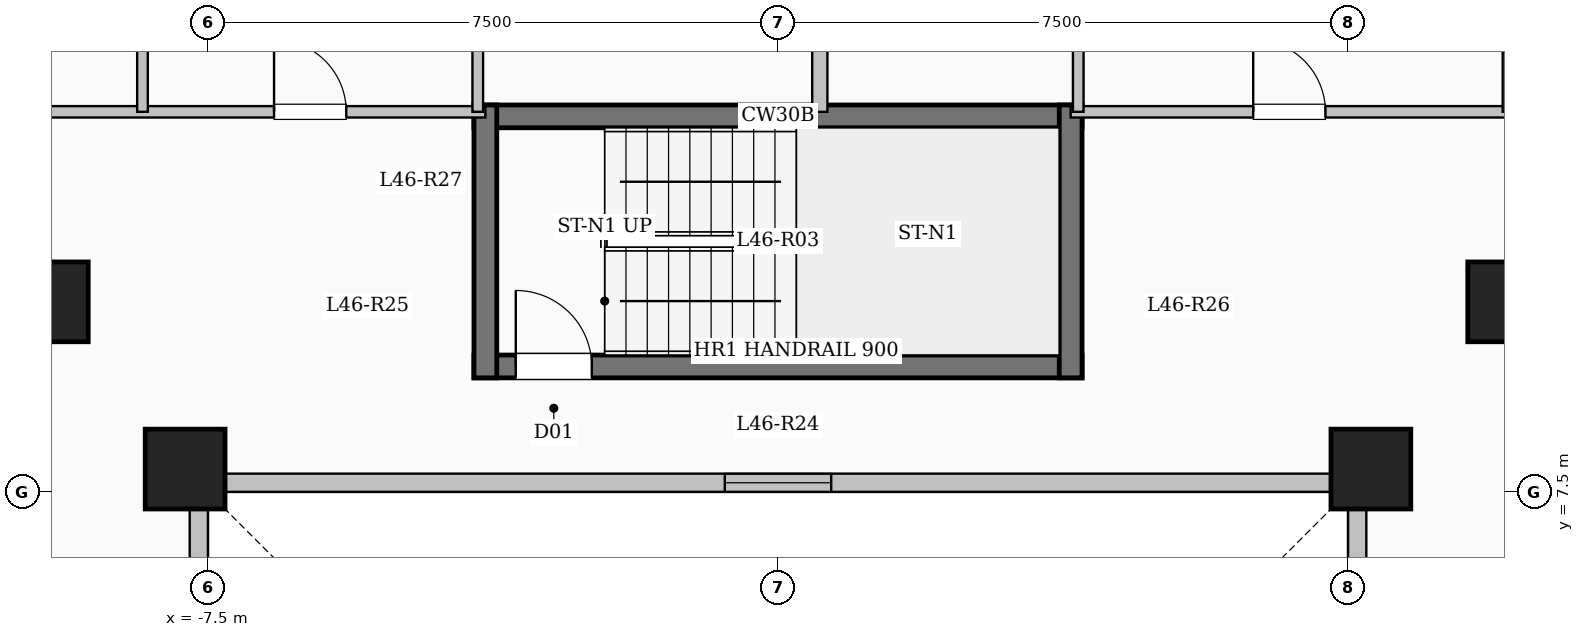
"""IFC4 building model, lengths in metres.
Left out: names, types, materials, properties, quantities, classifications, styles, units other than length and angle.
Written with IfcOpenShell. Run it as: python <this file> out.ifc"""

import sys

from ifc_helpers import new_model, si_unit, direction, frame, frame_2d, origin, origin_2d, place, context, subcontext, project, spatial, rectangle, extrude, element, fill, save


model = new_model("IFC4")
c1 = context("Model", 3, precision=1e-05, world=origin(), true_north=direction((0.0, 1.0)))
c2 = subcontext(c1, "Body", "Model", "MODEL_VIEW")
j1 = project(units=[si_unit("LENGTHUNIT", "METRE"), si_unit("PLANEANGLEUNIT", "RADIAN")], contexts=[c1])
p1 = place(None, origin())
s1 = spatial("IfcSite", under=j1, at=p1, CompositionType="ELEMENT")
p2 = place(p1, origin())
s2 = spatial("IfcBuilding", under=s1, at=p2, CompositionType="ELEMENT")
p3 = place(p2, frame((0.0, 0.0, 169.45)))
s3 = spatial("IfcBuildingStorey", under=s2, at=p3, CompositionType="ELEMENT", Elevation=169.45)
for number, where, z_axis, x_axis in (
    (1, (-7.8, 7.8, 0.0), (0.0, 0.0, 1.0), (1.0, 0.0, 0.0)),
    (2, (7.8, 7.8, 0.0), (0.0, 0.0, 1.0), (1.0, 0.0, 0.0)),
    (3, (-9.6, 10.0, 0.0), (0.0, 0.0, 1.0), (1.0, 0.0, 0.0)),
    (4, (9.6, 10.0, 0.0), (0.0, 0.0, 1.0), (1.0, 0.0, 0.0)),
):
    element("IfcColumn", number, at=place(p3, frame(where, z_axis=z_axis, x_axis=x_axis)), inside=s3, PredefinedType="COLUMN", context=c2, shape_type="SweptSolid", body=[
        extrude(rectangle(XDim=1.05, YDim=1.05, at=origin_2d()), origin(), (0.0, 0.0, 1.0), 3.35),
    ])
p4 = place(p3, frame((7.62, -7.62, 0.0), z_axis=(0.0, 0.0, 1.0), x_axis=(0.0, 1.0, 0.0)))
e5 = element("IfcWall", 5, at=p4, inside=s3, PredefinedType="SOLIDWALL", context=c2, shape_type="SweptSolid", body=[
    extrude(rectangle(XDim=15.24, YDim=0.24, at=frame_2d((7.62, 0.0))), origin(), (0.0, 0.0, 1.0), 3.05),
])
p5 = place(p4, frame((6.92, 0.0, 0.95)))
e6 = element("IfcOpeningElement", 6, at=p5, cuts=e5, PredefinedType="OPENING", context=c2, shape_type="SweptSolid", body=[
    extrude(rectangle(XDim=1.4, YDim=1.5, at=frame_2d((0.7, 0.75))), frame((0.0, 0.13, 0.0), z_axis=(0.0, -1.0, 0.0), x_axis=(1.0, 0.0, 0.0)), (0.0, 0.0, 1.0), 0.26),
])
p6 = place(p3, frame((7.62, 7.62, 0.0), z_axis=(0.0, 0.0, 1.0), x_axis=(-1.0, 0.0, 0.0)))
e7 = element("IfcWall", 7, at=p6, inside=s3, PredefinedType="SOLIDWALL", context=c2, shape_type="SweptSolid", body=[
    extrude(rectangle(XDim=15.24, YDim=0.24, at=frame_2d((7.62, 0.0))), origin(), (0.0, 0.0, 1.0), 3.05),
])
p7 = place(p6, frame((6.92, 0.0, 0.95)))
e8 = element("IfcOpeningElement", 8, at=p7, cuts=e7, PredefinedType="OPENING", context=c2, shape_type="SweptSolid", body=[
    extrude(rectangle(XDim=1.4, YDim=1.5, at=frame_2d((0.7, 0.75))), frame((0.0, 0.13, 0.0), z_axis=(0.0, -1.0, 0.0), x_axis=(1.0, 0.0, 0.0)), (0.0, 0.0, 1.0), 0.26),
])
p8 = place(p3, frame((-7.62, 7.62, 0.0), z_axis=(0.0, 0.0, 1.0), x_axis=(0.0, -1.0, 0.0)))
e9 = element("IfcWall", 9, at=p8, inside=s3, PredefinedType="SOLIDWALL", context=c2, shape_type="SweptSolid", body=[
    extrude(rectangle(XDim=15.24, YDim=0.24, at=frame_2d((7.62, 0.0))), origin(), (0.0, 0.0, 1.0), 3.05),
])
p9 = place(p8, frame((6.92, 0.0, 0.95)))
e10 = element("IfcOpeningElement", 10, at=p9, cuts=e9, PredefinedType="OPENING", context=c2, shape_type="SweptSolid", body=[
    extrude(rectangle(XDim=1.4, YDim=1.5, at=frame_2d((0.7, 0.75))), frame((0.0, 0.13, 0.0), z_axis=(0.0, -1.0, 0.0), x_axis=(1.0, 0.0, 0.0)), (0.0, 0.0, 1.0), 0.26),
])
p10 = place(p3, frame((-4.0, 12.44, 0.0), z_axis=(0.0, 0.0, 1.0), x_axis=(1.0, 0.0, 0.0)))
e11 = element("IfcWall", 11, at=p10, inside=s3, PredefinedType="SHEAR", context=c2, shape_type="SweptSolid", body=[
    extrude(rectangle(XDim=8.0, YDim=0.3, at=frame_2d((4.0, 0.0))), origin(), (0.0, 0.0, 1.0), 3.35),
])
p11 = place(p3, frame((-4.0, 9.15, 0.0), z_axis=(0.0, 0.0, 1.0), x_axis=(1.0, 0.0, 0.0)))
e12 = element("IfcWall", 12, at=p11, inside=s3, PredefinedType="SHEAR", context=c2, shape_type="SweptSolid", body=[
    extrude(rectangle(XDim=8.0, YDim=0.3, at=frame_2d((4.0, 0.0))), origin(), (0.0, 0.0, 1.0), 3.35),
])
p12 = place(p11, frame((0.55, 0.0, 0.0)))
e13 = element("IfcOpeningElement", 13, at=p12, cuts=e12, PredefinedType="OPENING", context=c2, shape_type="SweptSolid", body=[
    extrude(rectangle(XDim=1.0, YDim=2.15, at=frame_2d((0.5, 1.075))), frame((0.0, 0.16, 0.0), z_axis=(0.0, -1.0, 0.0), x_axis=(1.0, 0.0, 0.0)), (0.0, 0.0, 1.0), 0.32),
])
for number, where, z_axis, x_axis in (
    (14, (-3.85, 9.0, 0.0), (0.0, 0.0, 1.0), (0.0, 1.0, 0.0)),
    (15, (3.85, 9.0, 0.0), (0.0, 0.0, 1.0), (0.0, 1.0, 0.0)),
):
    element("IfcWall", number, at=place(p3, frame(where, z_axis=z_axis, x_axis=x_axis)), inside=s3, PredefinedType="SHEAR", context=c2, shape_type="SweptSolid", body=[
        extrude(rectangle(XDim=3.59, YDim=0.3, at=frame_2d((1.795, 0.0))), origin(), (0.0, 0.0, 1.0), 3.35),
    ])
p13 = place(p3, frame((-19.55, 12.5, 0.0), z_axis=(0.0, 0.0, 1.0), x_axis=(1.0, 0.0, 0.0)))
e16 = element("IfcWall", 16, at=p13, inside=s3, PredefinedType="PARTITIONING", context=c2, shape_type="SweptSolid", body=[
    extrude(rectangle(XDim=15.7, YDim=0.15, at=frame_2d((7.85, 0.0))), origin(), (0.0, 0.0, 1.0), 3.05),
])
p14 = place(p13, frame((2.292, 0.0, 0.0)))
e17 = element("IfcOpeningElement", 17, at=p14, cuts=e16, PredefinedType="OPENING", context=c2, shape_type="SweptSolid", body=[
    extrude(rectangle(XDim=0.95, YDim=2.15, at=frame_2d((0.475, 1.075))), frame((0.0, 0.085, 0.0), z_axis=(0.0, -1.0, 0.0), x_axis=(1.0, 0.0, 0.0)), (0.0, 0.0, 1.0), 0.17),
])
p15 = place(p13, frame((7.917, 0.0, 0.0)))
e18 = element("IfcOpeningElement", 18, at=p15, cuts=e16, PredefinedType="OPENING", context=c2, shape_type="SweptSolid", body=[
    extrude(rectangle(XDim=0.95, YDim=2.15, at=frame_2d((0.475, 1.075))), frame((0.0, 0.085, 0.0), z_axis=(0.0, -1.0, 0.0), x_axis=(1.0, 0.0, 0.0)), (0.0, 0.0, 1.0), 0.17),
])
p16 = place(p13, frame((12.92, 0.0, 0.0)))
e19 = element("IfcOpeningElement", 19, at=p16, cuts=e16, PredefinedType="OPENING", context=c2, shape_type="SweptSolid", body=[
    extrude(rectangle(XDim=0.95, YDim=2.15, at=frame_2d((0.475, 1.075))), frame((0.0, 0.085, 0.0), z_axis=(0.0, -1.0, 0.0), x_axis=(1.0, 0.0, 0.0)), (0.0, 0.0, 1.0), 0.17),
])
p17 = place(p3, frame((3.85, 12.5, 0.0), z_axis=(0.0, 0.0, 1.0), x_axis=(1.0, 0.0, 0.0)))
e20 = element("IfcWall", 20, at=p17, inside=s3, PredefinedType="PARTITIONING", context=c2, shape_type="SweptSolid", body=[
    extrude(rectangle(XDim=15.7, YDim=0.15, at=frame_2d((7.85, 0.0))), origin(), (0.0, 0.0, 1.0), 3.05),
])
p18 = place(p17, frame((2.402, 0.0, 0.0)))
e21 = element("IfcOpeningElement", 21, at=p18, cuts=e20, PredefinedType="OPENING", context=c2, shape_type="SweptSolid", body=[
    extrude(rectangle(XDim=0.95, YDim=2.15, at=frame_2d((0.475, 1.075))), frame((0.0, 0.085, 0.0), z_axis=(0.0, -1.0, 0.0), x_axis=(1.0, 0.0, 0.0)), (0.0, 0.0, 1.0), 0.17),
])
p19 = place(p17, frame((8.026, 0.0, 0.0)))
e22 = element("IfcOpeningElement", 22, at=p19, cuts=e20, PredefinedType="OPENING", context=c2, shape_type="SweptSolid", body=[
    extrude(rectangle(XDim=0.95, YDim=2.15, at=frame_2d((0.475, 1.075))), frame((0.0, 0.085, 0.0), z_axis=(0.0, -1.0, 0.0), x_axis=(1.0, 0.0, 0.0)), (0.0, 0.0, 1.0), 0.17),
])
p20 = place(p17, frame((13.03, 0.0, 0.0)))
e23 = element("IfcOpeningElement", 23, at=p20, cuts=e20, PredefinedType="OPENING", context=c2, shape_type="SweptSolid", body=[
    extrude(rectangle(XDim=0.95, YDim=2.15, at=frame_2d((0.475, 1.075))), frame((0.0, 0.085, 0.0), z_axis=(0.0, -1.0, 0.0), x_axis=(1.0, 0.0, 0.0)), (0.0, 0.0, 1.0), 0.17),
])
p21 = place(p3, frame((0.55, 12.5, 0.0), z_axis=(0.0, 0.0, 1.0), x_axis=(0.0, 1.0, 0.0)))
e24 = element("IfcWall", 24, at=p21, inside=s3, PredefinedType="SOLIDWALL", context=c2, shape_type="SweptSolid", body=[
    extrude(rectangle(XDim=10.18, YDim=0.2, at=frame_2d((5.09, 0.0))), origin(), (0.0, 0.0, 1.0), 3.05),
])
p22 = place(p3, frame((-3.95, 12.5, 0.0), z_axis=(0.0, 0.0, 1.0), x_axis=(0.0, 1.0, 0.0)))
e25 = element("IfcWall", 25, at=p22, inside=s3, PredefinedType="PARTITIONING", context=c2, shape_type="SweptSolid", body=[
    extrude(rectangle(XDim=8.65, YDim=0.14, at=frame_2d((4.325, 0.0))), origin(), (0.0, 0.0, 1.0), 3.05),
])
p23 = place(p22, frame((1.2, 0.0, 0.0)))
e26 = element("IfcOpeningElement", 26, at=p23, cuts=e25, PredefinedType="OPENING", context=c2, shape_type="SweptSolid", body=[
    extrude(rectangle(XDim=0.95, YDim=2.15, at=frame_2d((0.475, 1.075))), frame((0.0, 0.08, 0.0), z_axis=(0.0, -1.0, 0.0), x_axis=(1.0, 0.0, 0.0)), (0.0, 0.0, 1.0), 0.16),
])
p24 = place(p3, frame((-8.361, 12.5, 0.0), z_axis=(0.0, 0.0, 1.0), x_axis=(0.0, 1.0, 0.0)))
e27 = element("IfcWall", 27, at=p24, inside=s3, PredefinedType="PARTITIONING", context=c2, shape_type="SweptSolid", body=[
    extrude(rectangle(XDim=8.65, YDim=0.14, at=frame_2d((4.325, 0.0))), origin(), (0.0, 0.0, 1.0), 3.05),
])
p25 = place(p3, frame((3.95, 12.5, 0.0), z_axis=(0.0, 0.0, 1.0), x_axis=(0.0, 1.0, 0.0)))
e28 = element("IfcWall", 28, at=p25, inside=s3, PredefinedType="PARTITIONING", context=c2, shape_type="SweptSolid", body=[
    extrude(rectangle(XDim=8.65, YDim=0.14, at=frame_2d((4.325, 0.0))), origin(), (0.0, 0.0, 1.0), 3.05),
])
p26 = place(p25, frame((1.2, 0.0, 0.0)))
e29 = element("IfcOpeningElement", 29, at=p26, cuts=e28, PredefinedType="OPENING", context=c2, shape_type="SweptSolid", body=[
    extrude(rectangle(XDim=0.95, YDim=2.15, at=frame_2d((0.475, 1.075))), frame((0.0, 0.08, 0.0), z_axis=(0.0, -1.0, 0.0), x_axis=(1.0, 0.0, 0.0)), (0.0, 0.0, 1.0), 0.16),
])
p27 = place(p3, frame((9.604, 12.5, 0.0), z_axis=(0.0, 0.0, 1.0), x_axis=(0.0, 1.0, 0.0)))
e30 = element("IfcWall", 30, at=p27, inside=s3, PredefinedType="PARTITIONING", context=c2, shape_type="SweptSolid", body=[
    extrude(rectangle(XDim=8.65, YDim=0.14, at=frame_2d((4.325, 0.0))), origin(), (0.0, 0.0, 1.0), 3.05),
])
p28 = place(p7, origin())
e31 = element("IfcWindow", 31, at=p28, inside=s3, PartitioningType="SINGLE_PANEL", PredefinedType="WINDOW", context=c2, shape_type="SweptSolid", body=[
    extrude(rectangle(XDim=1.4, YDim=1.5, at=frame_2d((0.7, 0.75))), frame((0.0, 0.03, 0.0), z_axis=(0.0, -1.0, 0.0), x_axis=(1.0, 0.0, 0.0)), (0.0, 0.0, 1.0), 0.06),
])
fill(e8, e31)
p29 = place(p12, origin())
e32 = element("IfcDoor", 32, at=p29, inside=s3, OperationType="SINGLE_SWING_LEFT", PredefinedType="DOOR", context=c2, shape_type="SweptSolid", body=[
    extrude(rectangle(XDim=1.0, YDim=2.15, at=frame_2d((0.5, 1.075))), frame((0.0, 0.025, 0.0), z_axis=(0.0, -1.0, 0.0), x_axis=(1.0, 0.0, 0.0)), (0.0, 0.0, 1.0), 0.05),
])
fill(e13, e32)
p30 = place(p16, origin())
e33 = element("IfcDoor", 33, at=p30, inside=s3, OperationType="SINGLE_SWING_LEFT", PredefinedType="DOOR", context=c2, shape_type="SweptSolid", body=[
    extrude(rectangle(XDim=0.95, YDim=2.15, at=frame_2d((0.475, 1.075))), frame((0.0, 0.025, 0.0), z_axis=(0.0, -1.0, 0.0), x_axis=(1.0, 0.0, 0.0)), (0.0, 0.0, 1.0), 0.05),
])
fill(e19, e33)
p31 = place(p18, origin())
e34 = element("IfcDoor", 34, at=p31, inside=s3, OperationType="SINGLE_SWING_LEFT", PredefinedType="DOOR", context=c2, shape_type="SweptSolid", body=[
    extrude(rectangle(XDim=0.95, YDim=2.15, at=frame_2d((0.475, 1.075))), frame((0.0, 0.025, 0.0), z_axis=(0.0, -1.0, 0.0), x_axis=(1.0, 0.0, 0.0)), (0.0, 0.0, 1.0), 0.05),
])
fill(e21, e34)
save(model, sys.argv[1])
